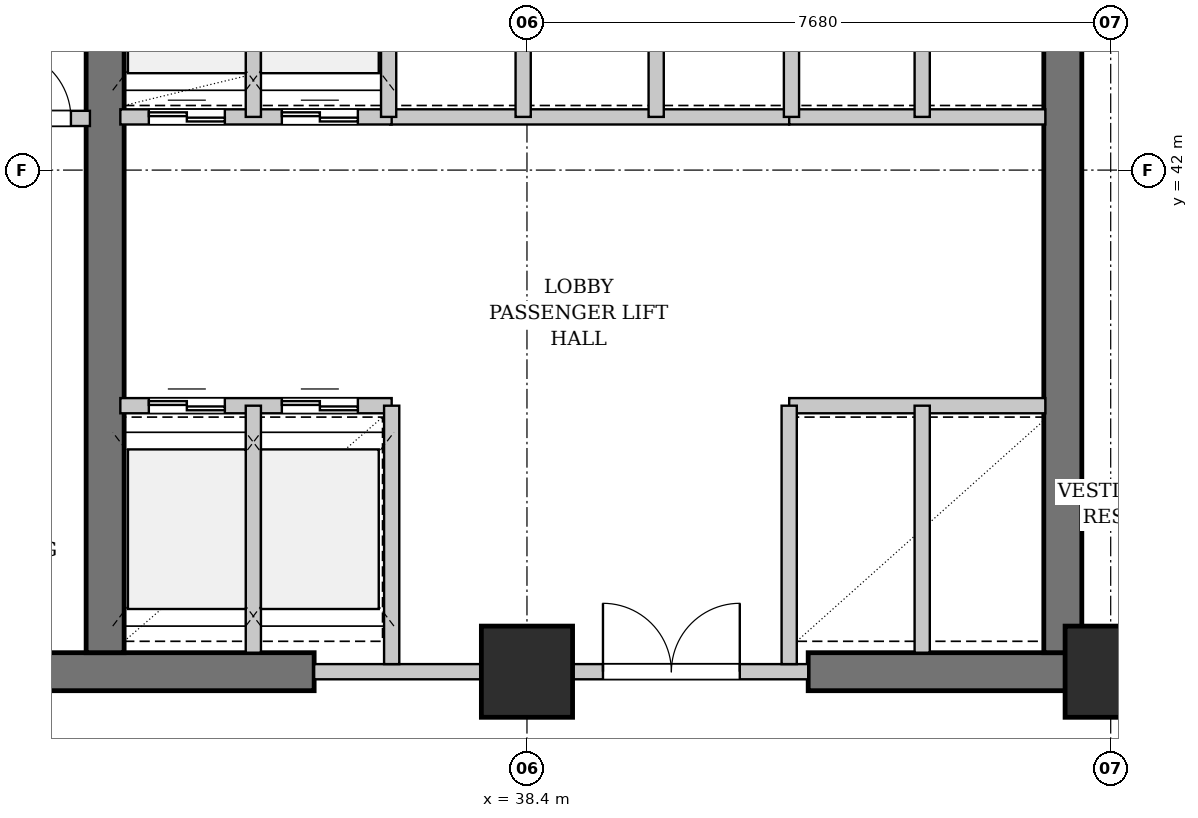
"""IFC4 building model, lengths in metres.
Left out: names, types, materials, properties, quantities, classifications, styles, units other than length and angle.
Written with IfcOpenShell. Run it as: python <this file> out.ifc"""

import sys

from ifc_helpers import new_model, si_unit, direction, frame, frame_2d, origin, origin_2d, place, context, subcontext, project, spatial, rectangle, extrude, element, fill, save


model = new_model("IFC4")
c1 = context("Model", 3, precision=1e-05, world=origin(), true_north=direction((0.0, 1.0)))
c2 = subcontext(c1, "Body", "Model", "MODEL_VIEW")
j1 = project(units=[si_unit("LENGTHUNIT", "METRE"), si_unit("PLANEANGLEUNIT", "RADIAN")], contexts=[c1])
p1 = place(None, origin())
s1 = spatial("IfcSite", under=j1, at=p1, CompositionType="ELEMENT")
p2 = place(p1, origin())
s2 = spatial("IfcBuilding", under=s1, at=p2, CompositionType="ELEMENT")
p3 = place(p2, frame((0.0, 0.0, 85.8)))
s3 = spatial("IfcBuildingStorey", under=s2, at=p3, CompositionType="ELEMENT", Elevation=85.8)
p4 = place(p3, frame((30.72, 35.4, 0.0), z_axis=(0.0, 0.0, 1.0), x_axis=(1.0, 0.0, 0.0)))
e1 = element("IfcWall", 1, at=p4, inside=s3, PredefinedType="SHEAR", context=c2, shape_type="SweptSolid", body=[
    extrude(rectangle(XDim=4.88, YDim=0.5, at=frame_2d((2.44, 0.0))), origin(), (0.0, 0.0, 1.0), 3.48),
])
p5 = place(p3, frame((42.1, 35.4, 0.0), z_axis=(0.0, 0.0, 1.0), x_axis=(1.0, 0.0, 0.0)))
e2 = element("IfcWall", 2, at=p5, inside=s3, PredefinedType="SHEAR", context=c2, shape_type="SweptSolid", body=[
    extrude(rectangle(XDim=8.05, YDim=0.5, at=frame_2d((4.025, 0.0))), origin(), (0.0, 0.0, 1.0), 3.48),
])
p6 = place(p5, frame((4.85, 0.0, 0.0)))
e3 = element("IfcOpeningElement", 3, at=p6, cuts=e2, PredefinedType="OPENING", context=c2, shape_type="SweptSolid", body=[
    extrude(rectangle(XDim=0.9, YDim=2.15, at=frame_2d((0.45, 1.075))), frame((0.0, 0.26, 0.0), z_axis=(0.0, -1.0, 0.0), x_axis=(1.0, 0.0, 0.0)), (0.0, 0.0, 1.0), 0.52),
])
for number, where, z_axis, x_axis in (
    (4, (32.85, 35.65, 0.0), (0.0, 0.0, 1.0), (0.0, 1.0, 0.0)),
    (5, (45.45, 35.65, 0.0), (0.0, 0.0, 1.0), (0.0, 1.0, 0.0)),
):
    element("IfcWall", number, at=place(p3, frame(where, z_axis=z_axis, x_axis=x_axis)), inside=s3, PredefinedType="SHEAR", context=c2, shape_type="SweptSolid", body=[
        extrude(rectangle(XDim=10.3, YDim=0.5, at=frame_2d((5.15, 0.0))), origin(), (0.0, 0.0, 1.0), 3.48),
    ])
for number, where, z_axis, x_axis in (
    (6, (38.4, 35.4, 0.0), (0.0, 0.0, 1.0), (1.0, 0.0, 0.0)),
    (7, (46.08, 35.4, 0.0), (0.0, 0.0, 1.0), (1.0, 0.0, 0.0)),
):
    element("IfcColumn", number, at=place(p3, frame(where, z_axis=z_axis, x_axis=x_axis)), inside=s3, PredefinedType="COLUMN", context=c2, shape_type="SweptSolid", body=[
        extrude(rectangle(XDim=1.2, YDim=1.2, at=origin_2d()), origin(), (0.0, 0.0, 1.0), 3.9),
    ])
p7 = place(p3, frame((27.32, 42.68, 0.0), z_axis=(0.0, 0.0, 1.0), x_axis=(1.0, 0.0, 0.0)))
e8 = element("IfcWall", 8, at=p7, inside=s3, PredefinedType="PARTITIONING", context=c2, shape_type="SweptSolid", body=[
    extrude(rectangle(XDim=5.33, YDim=0.2, at=frame_2d((2.665, 0.0))), origin(), (0.0, 0.0, 1.0), 3.48),
])
p8 = place(p7, frame((4.18, 0.0, 0.0)))
e9 = element("IfcOpeningElement", 9, at=p8, cuts=e8, PredefinedType="OPENING", context=c2, shape_type="SweptSolid", body=[
    extrude(rectangle(XDim=0.9, YDim=2.15, at=frame_2d((0.45, 1.075))), frame((0.0, 0.11, 0.0), z_axis=(0.0, -1.0, 0.0), x_axis=(1.0, 0.0, 0.0)), (0.0, 0.0, 1.0), 0.22),
])
p9 = place(p3, frame((35.6, 35.4, 0.0), z_axis=(0.0, 0.0, 1.0), x_axis=(1.0, 0.0, 0.0)))
e10 = element("IfcWall", 10, at=p9, inside=s3, PredefinedType="PARTITIONING", context=c2, shape_type="SweptSolid", body=[
    extrude(rectangle(XDim=6.5, YDim=0.2, at=frame_2d((3.25, 0.0))), origin(), (0.0, 0.0, 1.0), 2.275),
])
p10 = place(p9, frame((3.8, 0.0, 0.0)))
e11 = element("IfcOpeningElement", 11, at=p10, cuts=e10, PredefinedType="OPENING", context=c2, shape_type="SweptSolid", body=[
    extrude(rectangle(XDim=1.8, YDim=2.3, at=frame_2d((0.9, 1.15))), frame((0.0, 0.11, 0.0), z_axis=(0.0, -1.0, 0.0), x_axis=(1.0, 0.0, 0.0)), (0.0, 0.0, 1.0), 0.22),
])
p11 = place(p3, frame((36.6, 42.7, 0.0), z_axis=(0.0, 0.0, 1.0), x_axis=(1.0, 0.0, 0.0)))
e12 = element("IfcWall", 12, at=p11, inside=s3, PredefinedType="PARTITIONING", context=c2, shape_type="SweptSolid", body=[
    extrude(rectangle(XDim=5.25, YDim=0.2, at=frame_2d((2.625, 0.0))), origin(), (0.0, 0.0, 1.0), 3.48),
])
p12 = place(p3, frame((38.35, 42.7, 0.0), z_axis=(0.0, 0.0, 1.0), x_axis=(0.0, 1.0, 0.0)))
e13 = element("IfcWall", 13, at=p12, inside=s3, PredefinedType="PARTITIONING", context=c2, shape_type="SweptSolid", body=[
    extrude(rectangle(XDim=3.22, YDim=0.2, at=frame_2d((1.61, 0.0))), origin(), (0.0, 0.0, 1.0), 2.565),
])
p13 = place(p3, frame((40.1, 42.7, 0.0), z_axis=(0.0, 0.0, 1.0), x_axis=(0.0, 1.0, 0.0)))
e14 = element("IfcWall", 14, at=p13, inside=s3, PredefinedType="PARTITIONING", context=c2, shape_type="SweptSolid", body=[
    extrude(rectangle(XDim=3.22, YDim=0.2, at=frame_2d((1.61, 0.0))), origin(), (0.0, 0.0, 1.0), 3.48),
])
p14 = place(p3, frame((33.05, 38.9, 0.0), z_axis=(0.0, 0.0, 1.0), x_axis=(1.0, 0.0, 0.0)))
e15 = element("IfcWall", 15, at=p14, inside=s3, PredefinedType="PARTITIONING", context=c2, shape_type="SweptSolid", body=[
    extrude(rectangle(XDim=3.57, YDim=0.2, at=frame_2d((1.785, 0.0))), origin(), (0.0, 0.0, 1.0), 3.48),
])
p15 = place(p14, frame((0.375, 0.0, 0.0)))
e16 = element("IfcOpeningElement", 16, at=p15, cuts=e15, PredefinedType="OPENING", context=c2, shape_type="SweptSolid", body=[
    extrude(rectangle(XDim=1.0, YDim=2.2, at=frame_2d((0.5, 1.1))), frame((0.0, 0.11, 0.0), z_axis=(0.0, -1.0, 0.0), x_axis=(1.0, 0.0, 0.0)), (0.0, 0.0, 1.0), 0.22),
])
p16 = place(p14, frame((2.125, 0.0, 0.0)))
e17 = element("IfcOpeningElement", 17, at=p16, cuts=e15, PredefinedType="OPENING", context=c2, shape_type="SweptSolid", body=[
    extrude(rectangle(XDim=1.0, YDim=2.2, at=frame_2d((0.5, 1.1))), frame((0.0, 0.11, 0.0), z_axis=(0.0, -1.0, 0.0), x_axis=(1.0, 0.0, 0.0)), (0.0, 0.0, 1.0), 0.22),
])
p17 = place(p3, frame((33.05, 42.7, 0.0), z_axis=(0.0, 0.0, 1.0), x_axis=(1.0, 0.0, 0.0)))
e18 = element("IfcWall", 18, at=p17, inside=s3, PredefinedType="PARTITIONING", context=c2, shape_type="SweptSolid", body=[
    extrude(rectangle(XDim=3.57, YDim=0.2, at=frame_2d((1.785, 0.0))), origin(), (0.0, 0.0, 1.0), 3.48),
])
p18 = place(p17, frame((0.375, 0.0, 0.0)))
e19 = element("IfcOpeningElement", 19, at=p18, cuts=e18, PredefinedType="OPENING", context=c2, shape_type="SweptSolid", body=[
    extrude(rectangle(XDim=1.0, YDim=2.2, at=frame_2d((0.5, 1.1))), frame((0.0, 0.11, 0.0), z_axis=(0.0, -1.0, 0.0), x_axis=(1.0, 0.0, 0.0)), (0.0, 0.0, 1.0), 0.22),
])
p19 = place(p17, frame((2.125, 0.0, 0.0)))
e20 = element("IfcOpeningElement", 20, at=p19, cuts=e18, PredefinedType="OPENING", context=c2, shape_type="SweptSolid", body=[
    extrude(rectangle(XDim=1.0, YDim=2.2, at=frame_2d((0.5, 1.1))), frame((0.0, 0.11, 0.0), z_axis=(0.0, -1.0, 0.0), x_axis=(1.0, 0.0, 0.0)), (0.0, 0.0, 1.0), 0.22),
])
p20 = place(p3, frame((34.8, 35.65, 0.0), z_axis=(0.0, 0.0, 1.0), x_axis=(0.0, 1.0, 0.0)))
e21 = element("IfcWall", 21, at=p20, inside=s3, PredefinedType="PARTITIONING", context=c2, shape_type="SweptSolid", body=[
    extrude(rectangle(XDim=3.25, YDim=0.2, at=frame_2d((1.625, 0.0))), origin(), (0.0, 0.0, 1.0), 3.48),
])
p21 = place(p3, frame((34.8, 42.7, 0.0), z_axis=(0.0, 0.0, 1.0), x_axis=(0.0, 1.0, 0.0)))
e22 = element("IfcWall", 22, at=p21, inside=s3, PredefinedType="PARTITIONING", context=c2, shape_type="SweptSolid", body=[
    extrude(rectangle(XDim=3.22, YDim=0.2, at=frame_2d((1.61, 0.0))), origin(), (0.0, 0.0, 1.0), 3.48),
])
p22 = place(p3, frame((36.62, 35.5, 0.0), z_axis=(0.0, 0.0, 1.0), x_axis=(0.0, 1.0, 0.0)))
e23 = element("IfcWall", 23, at=p22, inside=s3, PredefinedType="PARTITIONING", context=c2, shape_type="SweptSolid", body=[
    extrude(rectangle(XDim=3.4, YDim=0.2, at=frame_2d((1.7, 0.0))), origin(), (0.0, 0.0, 1.0), 3.48),
])
p23 = place(p3, frame((36.58, 42.7, 0.0), z_axis=(0.0, 0.0, 1.0), x_axis=(0.0, 1.0, 0.0)))
e24 = element("IfcWall", 24, at=p23, inside=s3, PredefinedType="PARTITIONING", context=c2, shape_type="SweptSolid", body=[
    extrude(rectangle(XDim=3.22, YDim=0.2, at=frame_2d((1.61, 0.0))), origin(), (0.0, 0.0, 1.0), 3.48),
])
for number, where, z_axis, x_axis in (
    (25, (41.85, 38.9, 0.0), (0.0, 0.0, 1.0), (1.0, 0.0, 0.0)),
    (26, (41.85, 42.7, 0.0), (0.0, 0.0, 1.0), (1.0, 0.0, 0.0)),
):
    element("IfcWall", number, at=place(p3, frame(where, z_axis=z_axis, x_axis=x_axis)), inside=s3, PredefinedType="PARTITIONING", context=c2, shape_type="SweptSolid", body=[
        extrude(rectangle(XDim=3.37, YDim=0.2, at=frame_2d((1.685, 0.0))), origin(), (0.0, 0.0, 1.0), 3.48),
    ])
p24 = place(p3, frame((43.6, 35.65, 0.0), z_axis=(0.0, 0.0, 1.0), x_axis=(0.0, 1.0, 0.0)))
e27 = element("IfcWall", 27, at=p24, inside=s3, PredefinedType="PARTITIONING", context=c2, shape_type="SweptSolid", body=[
    extrude(rectangle(XDim=3.25, YDim=0.2, at=frame_2d((1.625, 0.0))), origin(), (0.0, 0.0, 1.0), 3.48),
])
p25 = place(p3, frame((43.6, 42.7, 0.0), z_axis=(0.0, 0.0, 1.0), x_axis=(0.0, 1.0, 0.0)))
e28 = element("IfcWall", 28, at=p25, inside=s3, PredefinedType="PARTITIONING", context=c2, shape_type="SweptSolid", body=[
    extrude(rectangle(XDim=3.22, YDim=0.2, at=frame_2d((1.61, 0.0))), origin(), (0.0, 0.0, 1.0), 3.48),
])
p26 = place(p3, frame((41.85, 35.5, 0.0), z_axis=(0.0, 0.0, 1.0), x_axis=(0.0, 1.0, 0.0)))
e29 = element("IfcWall", 29, at=p26, inside=s3, PredefinedType="PARTITIONING", context=c2, shape_type="SweptSolid", body=[
    extrude(rectangle(XDim=3.4, YDim=0.2, at=frame_2d((1.7, 0.0))), origin(), (0.0, 0.0, 1.0), 3.48),
])
p27 = place(p3, frame((41.88, 42.7, 0.0), z_axis=(0.0, 0.0, 1.0), x_axis=(0.0, 1.0, 0.0)))
e30 = element("IfcWall", 30, at=p27, inside=s3, PredefinedType="PARTITIONING", context=c2, shape_type="SweptSolid", body=[
    extrude(rectangle(XDim=3.22, YDim=0.2, at=frame_2d((1.61, 0.0))), origin(), (0.0, 0.0, 1.0), 3.48),
])
p28 = place(p8, origin())
e31 = element("IfcDoor", 31, at=p28, inside=s3, OperationType="SINGLE_SWING_LEFT", PredefinedType="DOOR", context=c2, shape_type="SweptSolid", body=[
    extrude(rectangle(XDim=0.9, YDim=2.15, at=frame_2d((0.45, 1.075))), frame((0.0, 0.025, 0.0), z_axis=(0.0, -1.0, 0.0), x_axis=(1.0, 0.0, 0.0)), (0.0, 0.0, 1.0), 0.05),
])
fill(e9, e31)
p29 = place(p10, origin())
e32 = element("IfcDoor", 32, at=p29, inside=s3, OperationType="DOUBLE_DOOR_SINGLE_SWING", PredefinedType="DOOR", context=c2, shape_type="SweptSolid", body=[
    extrude(rectangle(XDim=1.8, YDim=2.3, at=frame_2d((0.9, 1.15))), frame((0.0, 0.025, 0.0), z_axis=(0.0, -1.0, 0.0), x_axis=(1.0, 0.0, 0.0)), (0.0, 0.0, 1.0), 0.05),
])
fill(e11, e32)
p30 = place(p15, origin())
e33 = element("IfcDoor", 33, at=p30, inside=s3, OperationType="DOUBLE_DOOR_SLIDING", PredefinedType="DOOR", context=c2, shape_type="SweptSolid", body=[
    extrude(rectangle(XDim=1.0, YDim=2.2, at=frame_2d((0.5, 1.1))), frame((0.0, 0.025, 0.0), z_axis=(0.0, -1.0, 0.0), x_axis=(1.0, 0.0, 0.0)), (0.0, 0.0, 1.0), 0.05),
])
fill(e16, e33)
p31 = place(p16, origin())
e34 = element("IfcDoor", 34, at=p31, inside=s3, OperationType="DOUBLE_DOOR_SLIDING", PredefinedType="DOOR", context=c2, shape_type="SweptSolid", body=[
    extrude(rectangle(XDim=1.0, YDim=2.2, at=frame_2d((0.5, 1.1))), frame((0.0, 0.025, 0.0), z_axis=(0.0, -1.0, 0.0), x_axis=(1.0, 0.0, 0.0)), (0.0, 0.0, 1.0), 0.05),
])
fill(e17, e34)
p32 = place(p18, origin())
e35 = element("IfcDoor", 35, at=p32, inside=s3, OperationType="DOUBLE_DOOR_SLIDING", PredefinedType="DOOR", context=c2, shape_type="SweptSolid", body=[
    extrude(rectangle(XDim=1.0, YDim=2.2, at=frame_2d((0.5, 1.1))), frame((0.0, 0.025, 0.0), z_axis=(0.0, -1.0, 0.0), x_axis=(1.0, 0.0, 0.0)), (0.0, 0.0, 1.0), 0.05),
])
fill(e19, e35)
p33 = place(p19, origin())
e36 = element("IfcDoor", 36, at=p33, inside=s3, OperationType="DOUBLE_DOOR_SLIDING", PredefinedType="DOOR", context=c2, shape_type="SweptSolid", body=[
    extrude(rectangle(XDim=1.0, YDim=2.2, at=frame_2d((0.5, 1.1))), frame((0.0, 0.025, 0.0), z_axis=(0.0, -1.0, 0.0), x_axis=(1.0, 0.0, 0.0)), (0.0, 0.0, 1.0), 0.05),
])
fill(e20, e36)
save(model, sys.argv[1])
